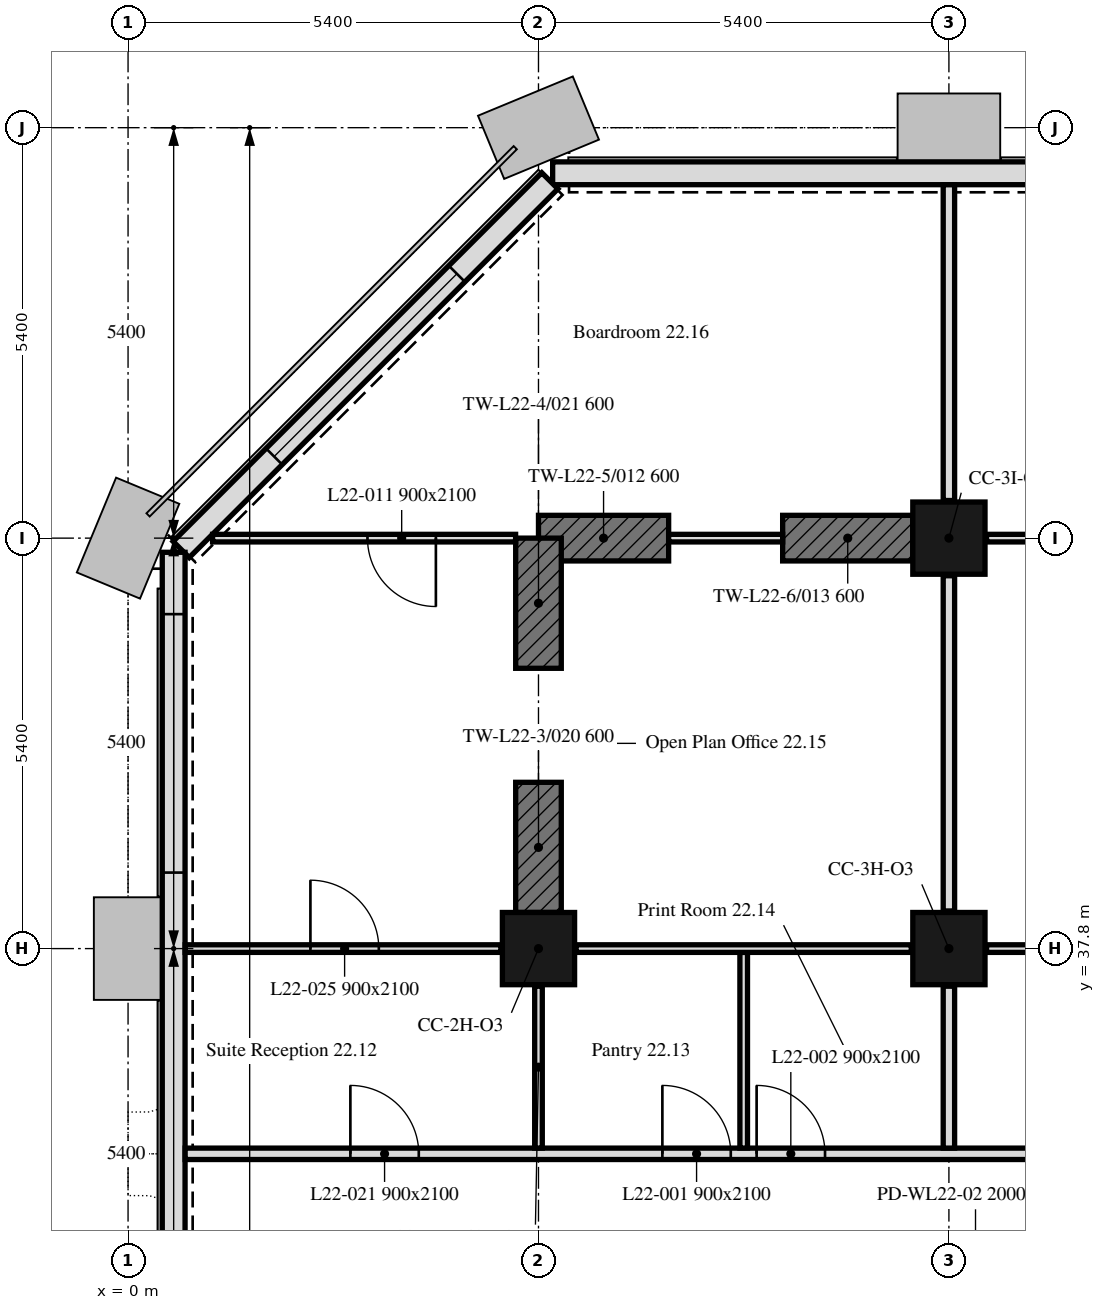
"""IFC4 building model, lengths in metres.
Left out: names, types, materials, properties, quantities, classifications, styles, units other than length and angle.
Written with IfcOpenShell. Run it as: python <this file> out.ifc"""

import sys

from ifc_helpers import new_model, si_unit, direction, frame, frame_2d, origin, origin_2d, place, context, subcontext, project, spatial, rectangle, extrude, element, fill, save


model = new_model("IFC4")
c1 = context("Model", 3, precision=1e-05, world=origin(), true_north=direction((0.0, 1.0)))
c2 = subcontext(c1, "Body", "Model", "MODEL_VIEW")
j1 = project(units=[si_unit("LENGTHUNIT", "METRE"), si_unit("PLANEANGLEUNIT", "RADIAN")], contexts=[c1])
p1 = place(None, origin())
s1 = spatial("IfcSite", under=j1, at=p1, CompositionType="ELEMENT")
p2 = place(p1, origin())
s2 = spatial("IfcBuilding", under=s1, at=p2, CompositionType="ELEMENT")
p3 = place(p2, frame((0.0, 0.0, 95.4)))
s3 = spatial("IfcBuildingStorey", under=s2, at=p3, CompositionType="ELEMENT", Elevation=95.4)
for number, where, z_axis, x_axis in (
    (1, (5.4, 37.8, 0.0), (0.0, 0.0, 1.0), (1.0, 0.0, 0.0)),
    (2, (10.8, 37.8, 0.0), (0.0, 0.0, 1.0), (1.0, 0.0, 0.0)),
    (3, (10.8, 43.2, 0.0), (0.0, 0.0, 1.0), (1.0, 0.0, 0.0)),
):
    element("IfcColumn", number, at=place(p3, frame(where, z_axis=z_axis, x_axis=x_axis)), inside=s3, PredefinedType="COLUMN", context=c2, shape_type="SweptSolid", body=[
        extrude(rectangle(XDim=0.95, YDim=0.95, at=origin_2d()), origin(), (0.0, 0.0, 1.0), 3.5),
    ])
p4 = place(p3, frame((5.4, 38.275, 0.0), z_axis=(0.0, 0.0, 1.0), x_axis=(0.0, 1.0, 0.0)))
e4 = element("IfcWall", 4, at=p4, inside=s3, PredefinedType="SHEAR", context=c2, shape_type="SweptSolid", body=[
    extrude(rectangle(XDim=1.713, YDim=0.6, at=frame_2d((0.856, 0.0))), origin(), (0.0, 0.0, 1.0), 3.5),
])
p5 = place(p3, frame((5.4, 41.488, 0.0), z_axis=(0.0, 0.0, 1.0), x_axis=(0.0, 1.0, 0.0)))
e5 = element("IfcWall", 5, at=p5, inside=s3, PredefinedType="SHEAR", context=c2, shape_type="SweptSolid", body=[
    extrude(rectangle(XDim=1.712, YDim=0.6, at=frame_2d((0.856, 0.0))), origin(), (0.0, 0.0, 1.0), 3.5),
])
p6 = place(p3, frame((5.4, 43.2, 0.0), z_axis=(0.0, 0.0, 1.0), x_axis=(1.0, 0.0, 0.0)))
e6 = element("IfcWall", 6, at=p6, inside=s3, PredefinedType="SHEAR", context=c2, shape_type="SweptSolid", body=[
    extrude(rectangle(XDim=1.713, YDim=0.6, at=frame_2d((0.856, 0.0))), origin(), (0.0, 0.0, 1.0), 3.5),
])
p7 = place(p3, frame((8.613, 43.2, 0.0), z_axis=(0.0, 0.0, 1.0), x_axis=(1.0, 0.0, 0.0)))
e7 = element("IfcWall", 7, at=p7, inside=s3, PredefinedType="SHEAR", context=c2, shape_type="SweptSolid", body=[
    extrude(rectangle(XDim=1.712, YDim=0.6, at=frame_2d((0.856, 0.0))), origin(), (0.0, 0.0, 1.0), 3.5),
])
p8 = place(p3, frame((37.614, 48.0, 0.0), z_axis=(0.0, 0.0, 1.0), x_axis=(-1.0, 0.0, 0.0)))
e8 = element("IfcWall", 8, at=p8, inside=s3, PredefinedType="SOLIDWALL", context=c2, shape_type="SweptSolid", body=[
    extrude(rectangle(XDim=32.027, YDim=0.3, at=frame_2d((16.014, 0.0))), origin(), (0.0, 0.0, 1.0), 3.5),
])
p9 = place(p8, frame((0.814, 0.0, 0.9)))
e9 = element("IfcOpeningElement", 9, at=p9, cuts=e8, PredefinedType="OPENING", context=c2, shape_type="SweptSolid", body=[
    extrude(rectangle(XDim=3.4, YDim=1.7, at=frame_2d((1.7, 0.85))), frame((0.0, 0.16, 0.0), z_axis=(0.0, -1.0, 0.0), x_axis=(1.0, 0.0, 0.0)), (0.0, 0.0, 1.0), 0.32),
])
p10 = place(p3, frame((5.55, 47.901, 0.0), z_axis=(0.0, 0.0, 1.0), x_axis=(-0.707106781187, -0.707106781187, 0.0)))
e10 = element("IfcWall", 10, at=p10, inside=s3, PredefinedType="SOLIDWALL", context=c2, shape_type="SweptSolid", body=[
    extrude(rectangle(XDim=6.86, YDim=0.3, at=frame_2d((3.43, 0.0))), origin(), (0.0, 0.0, 1.0), 3.5),
])
p11 = place(p10, frame((1.73, 0.0, 0.9)))
e11 = element("IfcOpeningElement", 11, at=p11, cuts=e10, PredefinedType="OPENING", context=c2, shape_type="SweptSolid", body=[
    extrude(rectangle(XDim=3.4, YDim=1.7, at=frame_2d((1.7, 0.85))), frame((0.0, 0.16, 0.0), z_axis=(0.0, -1.0, 0.0), x_axis=(1.0, 0.0, 0.0)), (0.0, 0.0, 1.0), 0.32),
])
p12 = place(p3, frame((0.6, 43.014, 0.0), z_axis=(0.0, 0.0, 1.0), x_axis=(0.0, -1.0, 0.0)))
e12 = element("IfcWall", 12, at=p12, inside=s3, PredefinedType="SOLIDWALL", context=c2, shape_type="SweptSolid", body=[
    extrude(rectangle(XDim=32.027, YDim=0.3, at=frame_2d((16.014, 0.0))), origin(), (0.0, 0.0, 1.0), 3.5),
])
p13 = place(p12, frame((0.814, 0.0, 0.9)))
e13 = element("IfcOpeningElement", 13, at=p13, cuts=e12, PredefinedType="OPENING", context=c2, shape_type="SweptSolid", body=[
    extrude(rectangle(XDim=3.4, YDim=1.7, at=frame_2d((1.7, 0.85))), frame((0.0, 0.16, 0.0), z_axis=(0.0, -1.0, 0.0), x_axis=(1.0, 0.0, 0.0)), (0.0, 0.0, 1.0), 0.32),
])
p14 = place(p3, frame((0.751, 35.1, 0.0), z_axis=(0.0, 0.0, 1.0), x_axis=(1.0, 0.0, 0.0)))
e14 = element("IfcWall", 14, at=p14, inside=s3, PredefinedType="PARTITIONING", context=c2, shape_type="SweptSolid", body=[
    extrude(rectangle(XDim=41.698, YDim=0.15, at=frame_2d((20.849, 0.0))), origin(), (0.0, 0.0, 1.0), 2.75),
])
p15 = place(p14, frame((6.279, 0.0, 0.0)))
e15 = element("IfcOpeningElement", 15, at=p15, cuts=e14, PredefinedType="OPENING", context=c2, shape_type="SweptSolid", body=[
    extrude(rectangle(XDim=0.9, YDim=2.1, at=frame_2d((0.45, 1.05))), frame((0.0, 0.075, 0.0), z_axis=(0.0, -1.0, 0.0), x_axis=(1.0, 0.0, 0.0)), (0.0, 0.0, 1.0), 0.15),
])
p16 = place(p14, frame((7.519, 0.0, 0.0)))
e16 = element("IfcOpeningElement", 16, at=p16, cuts=e14, PredefinedType="OPENING", context=c2, shape_type="SweptSolid", body=[
    extrude(rectangle(XDim=0.9, YDim=2.1, at=frame_2d((0.45, 1.05))), frame((0.0, 0.075, 0.0), z_axis=(0.0, -1.0, 0.0), x_axis=(1.0, 0.0, 0.0)), (0.0, 0.0, 1.0), 0.15),
])
p17 = place(p14, frame((17.079, 0.0, 0.0)))
e17 = element("IfcOpeningElement", 17, at=p17, cuts=e14, PredefinedType="OPENING", context=c2, shape_type="SweptSolid", body=[
    extrude(rectangle(XDim=0.9, YDim=2.1, at=frame_2d((0.45, 1.05))), frame((0.0, 0.075, 0.0), z_axis=(0.0, -1.0, 0.0), x_axis=(1.0, 0.0, 0.0)), (0.0, 0.0, 1.0), 0.15),
])
p18 = place(p14, frame((18.319, 0.0, 0.0)))
e18 = element("IfcOpeningElement", 18, at=p18, cuts=e14, PredefinedType="OPENING", context=c2, shape_type="SweptSolid", body=[
    extrude(rectangle(XDim=0.9, YDim=2.1, at=frame_2d((0.45, 1.05))), frame((0.0, 0.075, 0.0), z_axis=(0.0, -1.0, 0.0), x_axis=(1.0, 0.0, 0.0)), (0.0, 0.0, 1.0), 0.15),
])
p19 = place(p14, frame((38.511, 0.0, 0.0)))
e19 = element("IfcOpeningElement", 19, at=p19, cuts=e14, PredefinedType="OPENING", context=c2, shape_type="SweptSolid", body=[
    extrude(rectangle(XDim=0.9, YDim=2.1, at=frame_2d((0.45, 1.05))), frame((0.0, 0.075, 0.0), z_axis=(0.0, -1.0, 0.0), x_axis=(1.0, 0.0, 0.0)), (0.0, 0.0, 1.0), 0.15),
])
p20 = place(p14, frame((39.919, 0.0, 0.0)))
e20 = element("IfcOpeningElement", 20, at=p20, cuts=e14, PredefinedType="OPENING", context=c2, shape_type="SweptSolid", body=[
    extrude(rectangle(XDim=0.9, YDim=2.1, at=frame_2d((0.45, 1.05))), frame((0.0, 0.075, 0.0), z_axis=(0.0, -1.0, 0.0), x_axis=(1.0, 0.0, 0.0)), (0.0, 0.0, 1.0), 0.15),
])
p21 = place(p14, frame((2.174, 0.0, 0.0)))
e21 = element("IfcOpeningElement", 21, at=p21, cuts=e14, PredefinedType="OPENING", context=c2, shape_type="SweptSolid", body=[
    extrude(rectangle(XDim=0.9, YDim=2.1, at=frame_2d((0.45, 1.05))), frame((0.0, 0.075, 0.0), z_axis=(0.0, -1.0, 0.0), x_axis=(1.0, 0.0, 0.0)), (0.0, 0.0, 1.0), 0.15),
])
p22 = place(p14, frame((12.299, 0.0, 0.0)))
e22 = element("IfcOpeningElement", 22, at=p22, cuts=e14, PredefinedType="OPENING", context=c2, shape_type="SweptSolid", body=[
    extrude(rectangle(XDim=0.9, YDim=2.1, at=frame_2d((0.45, 1.05))), frame((0.0, 0.075, 0.0), z_axis=(0.0, -1.0, 0.0), x_axis=(1.0, 0.0, 0.0)), (0.0, 0.0, 1.0), 0.15),
])
p23 = place(p14, frame((23.099, 0.0, 0.0)))
e23 = element("IfcOpeningElement", 23, at=p23, cuts=e14, PredefinedType="OPENING", context=c2, shape_type="SweptSolid", body=[
    extrude(rectangle(XDim=0.9, YDim=2.1, at=frame_2d((0.45, 1.05))), frame((0.0, 0.075, 0.0), z_axis=(0.0, -1.0, 0.0), x_axis=(1.0, 0.0, 0.0)), (0.0, 0.0, 1.0), 0.15),
])
p24 = place(p3, frame((5.4, 37.305, 0.0), z_axis=(0.0, 0.0, 1.0), x_axis=(0.0, -1.0, 0.0)))
e24 = element("IfcWall", 24, at=p24, inside=s3, PredefinedType="PARTITIONING", context=c2, shape_type="SweptSolid", body=[
    extrude(rectangle(XDim=2.13, YDim=0.1, at=frame_2d((1.065, 0.0))), origin(), (0.0, 0.0, 1.0), 3.5),
])
p25 = place(p3, frame((0.751, 37.8, 0.0), z_axis=(0.0, 0.0, 1.0), x_axis=(1.0, 0.0, 0.0)))
e25 = element("IfcWall", 25, at=p25, inside=s3, PredefinedType="PARTITIONING", context=c2, shape_type="SweptSolid", body=[
    extrude(rectangle(XDim=4.154, YDim=0.1, at=frame_2d((2.077, 0.0))), origin(), (0.0, 0.0, 1.0), 2.75),
])
p26 = place(p25, frame((1.648, 0.0, 0.0)))
e26 = element("IfcOpeningElement", 26, at=p26, cuts=e25, PredefinedType="OPENING", context=c2, shape_type="SweptSolid", body=[
    extrude(rectangle(XDim=0.9, YDim=2.1, at=frame_2d((0.45, 1.05))), frame((0.0, 0.05, 0.0), z_axis=(0.0, -1.0, 0.0), x_axis=(1.0, 0.0, 0.0)), (0.0, 0.0, 1.0), 0.1),
])
p27 = place(p3, frame((8.1, 35.175, 0.0), z_axis=(0.0, 0.0, 1.0), x_axis=(0.0, 1.0, 0.0)))
e27 = element("IfcWall", 27, at=p27, inside=s3, PredefinedType="PARTITIONING", context=c2, shape_type="SweptSolid", body=[
    extrude(rectangle(XDim=2.575, YDim=0.1, at=frame_2d((1.288, 0.0))), origin(), (0.0, 0.0, 1.0), 3.5),
])
p28 = place(p3, frame((10.8, 35.175, 0.0), z_axis=(0.0, 0.0, 1.0), x_axis=(0.0, 1.0, 0.0)))
e28 = element("IfcWall", 28, at=p28, inside=s3, PredefinedType="PARTITIONING", context=c2, shape_type="SweptSolid", body=[
    extrude(rectangle(XDim=2.13, YDim=0.15, at=frame_2d((1.065, 0.0))), origin(), (0.0, 0.0, 1.0), 2.75),
])
p29 = place(p3, frame((10.305, 37.8, 0.0), z_axis=(0.0, 0.0, 1.0), x_axis=(-1.0, 0.0, 0.0)))
e29 = element("IfcWall", 29, at=p29, inside=s3, PredefinedType="PARTITIONING", context=c2, shape_type="SweptSolid", body=[
    extrude(rectangle(XDim=4.41, YDim=0.1, at=frame_2d((2.205, 0.0))), origin(), (0.0, 0.0, 1.0), 2.75),
])
p30 = place(p3, frame((8.613, 43.2, 0.0), z_axis=(0.0, 0.0, 1.0), x_axis=(-1.0, 0.0, 0.0)))
e30 = element("IfcWall", 30, at=p30, inside=s3, PredefinedType="PARTITIONING", context=c2, shape_type="SweptSolid", body=[
    extrude(rectangle(XDim=1.5, YDim=0.1, at=frame_2d((0.75, 0.0))), origin(), (0.0, 0.0, 1.0), 3.5),
])
p31 = place(p3, frame((5.099, 43.2, 0.0), z_axis=(0.0, 0.0, 1.0), x_axis=(-1.0, 0.0, 0.0)))
e31 = element("IfcWall", 31, at=p31, inside=s3, PredefinedType="PARTITIONING", context=c2, shape_type="SweptSolid", body=[
    extrude(rectangle(XDim=3.987, YDim=0.1, at=frame_2d((1.994, 0.0))), origin(), (0.0, 0.0, 1.0), 3.5),
])
p32 = place(p31, frame((1.049, 0.0, 0.0)))
e32 = element("IfcOpeningElement", 32, at=p32, cuts=e31, PredefinedType="OPENING", context=c2, shape_type="SweptSolid", body=[
    extrude(rectangle(XDim=0.9, YDim=2.1, at=frame_2d((0.45, 1.05))), frame((0.0, 0.05, 0.0), z_axis=(0.0, -1.0, 0.0), x_axis=(1.0, 0.0, 0.0)), (0.0, 0.0, 1.0), 0.1),
])
p33 = place(p3, frame((10.8, 38.295, 0.0), z_axis=(0.0, 0.0, 1.0), x_axis=(0.0, 1.0, 0.0)))
e33 = element("IfcWall", 33, at=p33, inside=s3, PredefinedType="PARTITIONING", context=c2, shape_type="SweptSolid", body=[
    extrude(rectangle(XDim=4.41, YDim=0.15, at=frame_2d((2.205, 0.0))), origin(), (0.0, 0.0, 1.0), 2.75),
])
p34 = place(p3, frame((10.8, 43.695, 0.0), z_axis=(0.0, 0.0, 1.0), x_axis=(0.0, 1.0, 0.0)))
e34 = element("IfcWall", 34, at=p34, inside=s3, PredefinedType="PARTITIONING", context=c2, shape_type="SweptSolid", body=[
    extrude(rectangle(XDim=4.154, YDim=0.15, at=frame_2d((2.077, 0.0))), origin(), (0.0, 0.0, 1.0), 2.75),
])
p35 = place(p3, frame((15.705, 37.8, 0.0), z_axis=(0.0, 0.0, 1.0), x_axis=(-1.0, 0.0, 0.0)))
e35 = element("IfcWall", 35, at=p35, inside=s3, PredefinedType="PARTITIONING", context=c2, shape_type="SweptSolid", body=[
    extrude(rectangle(XDim=4.41, YDim=0.1, at=frame_2d((2.205, 0.0))), origin(), (0.0, 0.0, 1.0), 2.75),
])
p36 = place(p35, frame((1.755, 0.0, 0.0)))
e36 = element("IfcOpeningElement", 36, at=p36, cuts=e35, PredefinedType="OPENING", context=c2, shape_type="SweptSolid", body=[
    extrude(rectangle(XDim=0.9, YDim=2.1, at=frame_2d((0.45, 1.05))), frame((0.0, 0.05, 0.0), z_axis=(0.0, -1.0, 0.0), x_axis=(1.0, 0.0, 0.0)), (0.0, 0.0, 1.0), 0.1),
])
p37 = place(p3, frame((15.705, 43.2, 0.0), z_axis=(0.0, 0.0, 1.0), x_axis=(-1.0, 0.0, 0.0)))
e37 = element("IfcWall", 37, at=p37, inside=s3, PredefinedType="PARTITIONING", context=c2, shape_type="SweptSolid", body=[
    extrude(rectangle(XDim=4.41, YDim=0.1, at=frame_2d((2.205, 0.0))), origin(), (0.0, 0.0, 1.0), 3.5),
])
p38 = place(p37, frame((1.755, 0.0, 0.0)))
e38 = element("IfcOpeningElement", 38, at=p38, cuts=e37, PredefinedType="OPENING", context=c2, shape_type="SweptSolid", body=[
    extrude(rectangle(XDim=0.9, YDim=2.1, at=frame_2d((0.45, 1.05))), frame((0.0, 0.05, 0.0), z_axis=(0.0, -1.0, 0.0), x_axis=(1.0, 0.0, 0.0)), (0.0, 0.0, 1.0), 0.1),
])
p39 = place(p11, origin())
e39 = element("IfcWindow", 39, at=p39, inside=s3, PartitioningType="SINGLE_PANEL", PredefinedType="WINDOW", context=c2, shape_type="SweptSolid", body=[
    extrude(rectangle(XDim=3.4, YDim=1.7, at=frame_2d((1.7, 0.85))), frame((0.0, 0.03, 0.0), z_axis=(0.0, -1.0, 0.0), x_axis=(1.0, 0.0, 0.0)), (0.0, 0.0, 1.0), 0.06),
])
fill(e11, e39)
p40 = place(p13, origin())
e40 = element("IfcWindow", 40, at=p40, inside=s3, PartitioningType="SINGLE_PANEL", PredefinedType="WINDOW", context=c2, shape_type="SweptSolid", body=[
    extrude(rectangle(XDim=3.4, YDim=1.7, at=frame_2d((1.7, 0.85))), frame((0.0, 0.03, 0.0), z_axis=(0.0, -1.0, 0.0), x_axis=(1.0, 0.0, 0.0)), (0.0, 0.0, 1.0), 0.06),
])
fill(e13, e40)
p41 = place(p15, origin())
e41 = element("IfcDoor", 41, at=p41, inside=s3, OperationType="SINGLE_SWING_RIGHT", PredefinedType="DOOR", context=c2, shape_type="SweptSolid", body=[
    extrude(rectangle(XDim=0.9, YDim=2.1, at=frame_2d((0.45, 1.05))), frame((0.0, 0.025, 0.0), z_axis=(0.0, -1.0, 0.0), x_axis=(1.0, 0.0, 0.0)), (0.0, 0.0, 1.0), 0.05),
])
fill(e15, e41)
p42 = place(p16, origin())
e42 = element("IfcDoor", 42, at=p42, inside=s3, OperationType="SINGLE_SWING_RIGHT", PredefinedType="DOOR", context=c2, shape_type="SweptSolid", body=[
    extrude(rectangle(XDim=0.9, YDim=2.1, at=frame_2d((0.45, 1.05))), frame((0.0, 0.025, 0.0), z_axis=(0.0, -1.0, 0.0), x_axis=(1.0, 0.0, 0.0)), (0.0, 0.0, 1.0), 0.05),
])
fill(e16, e42)
p43 = place(p32, origin())
e43 = element("IfcDoor", 43, at=p43, inside=s3, OperationType="SINGLE_SWING_LEFT", PredefinedType="DOOR", context=c2, shape_type="SweptSolid", body=[
    extrude(rectangle(XDim=0.9, YDim=2.1, at=frame_2d((0.45, 1.05))), frame((0.0, 0.025, 0.0), z_axis=(0.0, -1.0, 0.0), x_axis=(1.0, 0.0, 0.0)), (0.0, 0.0, 1.0), 0.05),
])
fill(e32, e43)
p44 = place(p21, origin())
e44 = element("IfcDoor", 44, at=p44, inside=s3, OperationType="SINGLE_SWING_RIGHT", PredefinedType="DOOR", context=c2, shape_type="SweptSolid", body=[
    extrude(rectangle(XDim=0.9, YDim=2.1, at=frame_2d((0.45, 1.05))), frame((0.0, 0.025, 0.0), z_axis=(0.0, -1.0, 0.0), x_axis=(1.0, 0.0, 0.0)), (0.0, 0.0, 1.0), 0.05),
])
fill(e21, e44)
p45 = place(p26, origin())
e45 = element("IfcDoor", 45, at=p45, inside=s3, OperationType="SINGLE_SWING_RIGHT", PredefinedType="DOOR", context=c2, shape_type="SweptSolid", body=[
    extrude(rectangle(XDim=0.9, YDim=2.1, at=frame_2d((0.45, 1.05))), frame((0.0, 0.025, 0.0), z_axis=(0.0, -1.0, 0.0), x_axis=(1.0, 0.0, 0.0)), (0.0, 0.0, 1.0), 0.05),
])
fill(e26, e45)
save(model, sys.argv[1])
